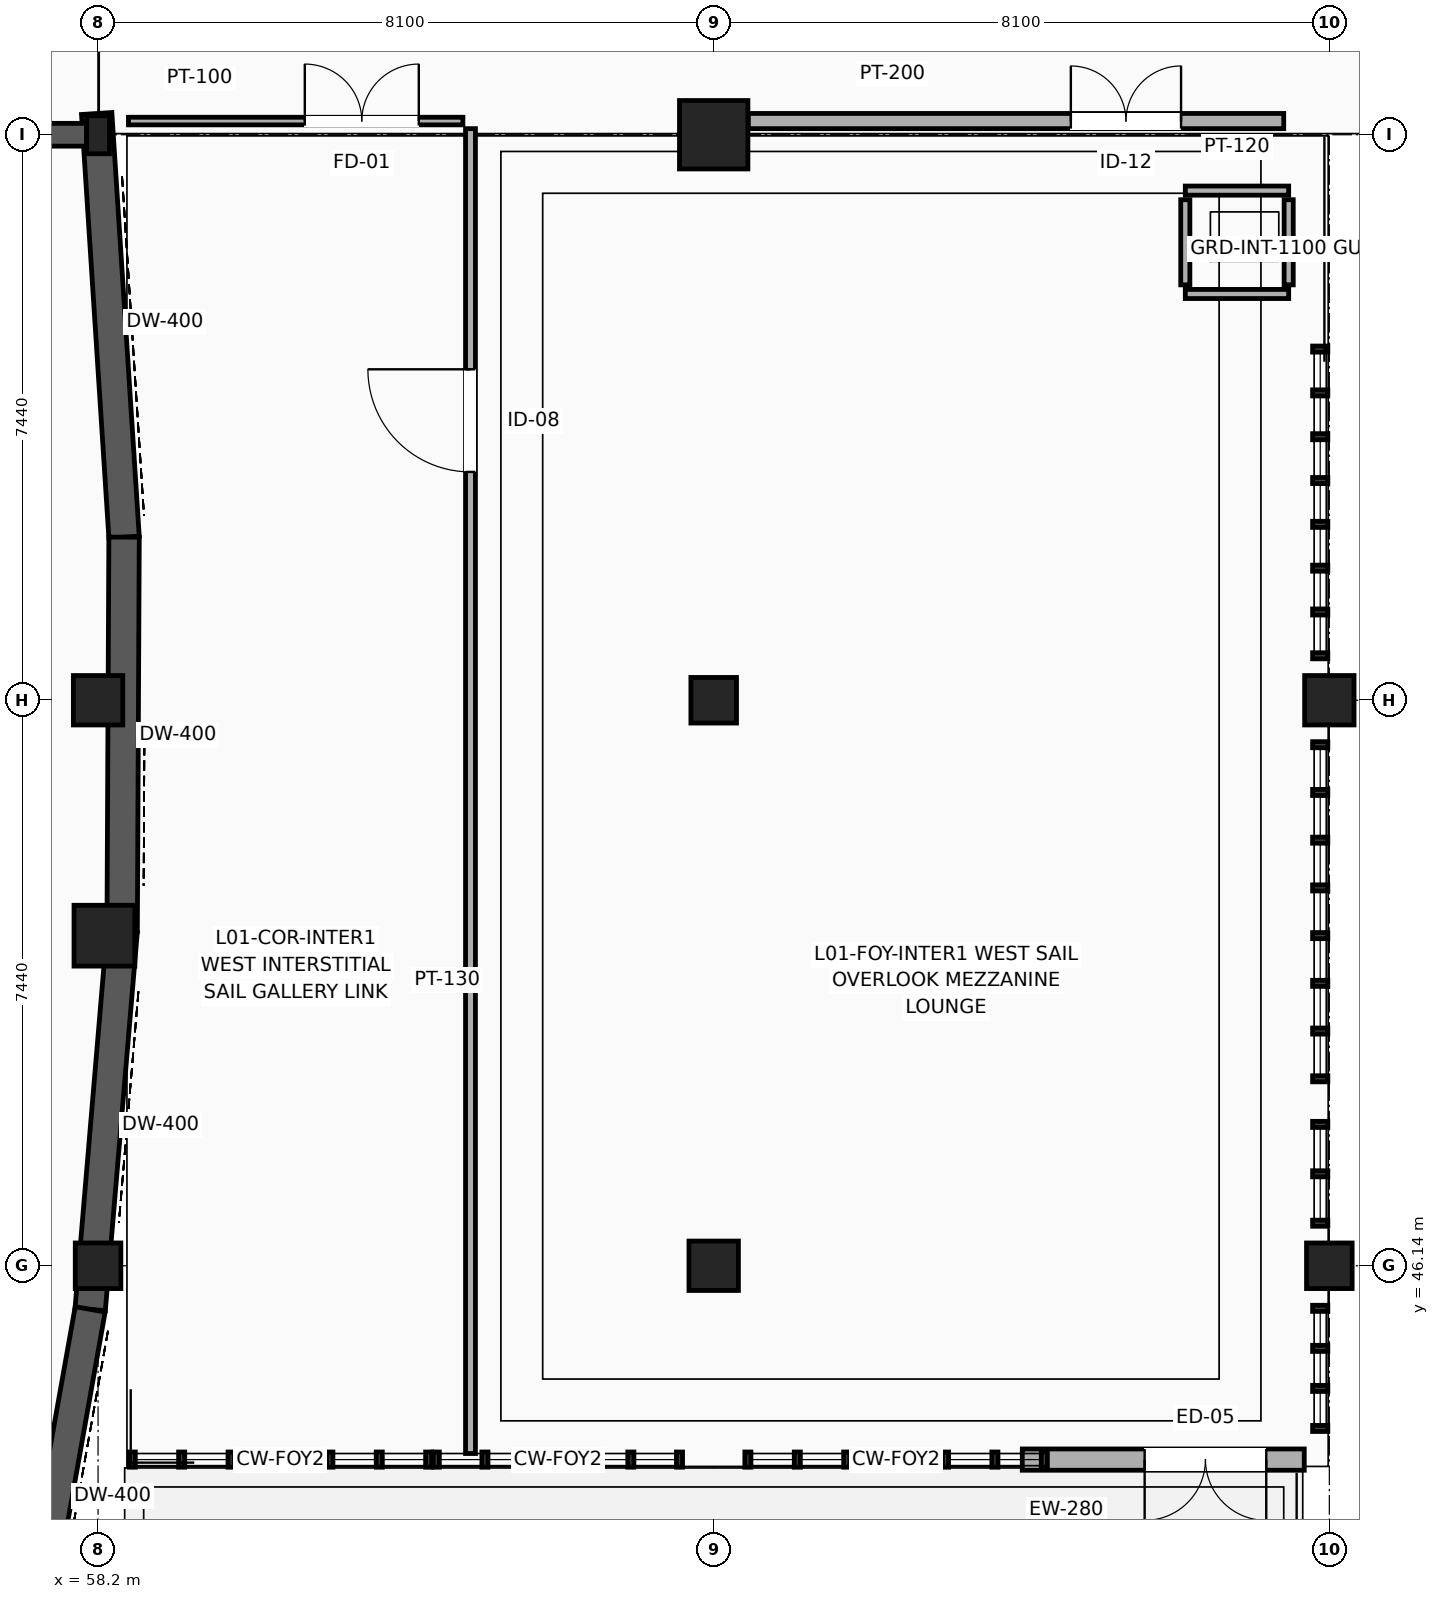
"""IFC4 building model, lengths in metres.
Left out: names, types, materials, properties, quantities, classifications, styles, units other than length and angle.
Written with IfcOpenShell. Run it as: python <this file> out.ifc"""

import sys

from ifc_helpers import new_model, si_unit, direction, frame, frame_2d, origin, origin_2d, place, context, subcontext, project, spatial, rectangle, circle, i_section, extrude, element, fill, save


model = new_model("IFC4")
c1 = context("Model", 3, precision=1e-05, world=origin(), true_north=direction((0.0, 1.0)))
c2 = subcontext(c1, "Body", "Model", "MODEL_VIEW")
j1 = project(units=[si_unit("LENGTHUNIT", "METRE"), si_unit("PLANEANGLEUNIT", "RADIAN")], contexts=[c1])
p1 = place(None, origin())
s1 = spatial("IfcSite", under=j1, at=p1, CompositionType="ELEMENT")
p2 = place(p1, origin())
s2 = spatial("IfcBuilding", under=s1, at=p2, CompositionType="ELEMENT")
p3 = place(p2, frame((0.0, 0.0, 5.4)))
s3 = spatial("IfcBuildingStorey", under=s2, at=p3, CompositionType="ELEMENT", Elevation=5.4)
p4 = place(p3, frame((58.2, 46.14, 0.0), z_axis=(0.0, 0.0, 1.0), x_axis=(1.0, 0.0, 0.0)))
e1 = element("IfcColumn", 1, at=p4, inside=s3, PredefinedType="COLUMN", context=c2, shape_type="SweptSolid", body=[
    extrude(rectangle(XDim=0.6, YDim=0.6, at=origin_2d()), origin(), (0.0, 0.0, 1.0), 4.8),
])
p5 = place(p3, frame((58.2, 53.58, 0.0), z_axis=(0.0, 0.0, 1.0), x_axis=(1.0, 0.0, 0.0)))
e2 = element("IfcColumn", 2, at=p5, inside=s3, PredefinedType="COLUMN", context=c2, shape_type="SweptSolid", body=[
    extrude(circle(Radius=0.325, at=origin_2d()), origin(), (0.0, 0.0, 1.0), 4.8),
])
p6 = place(p3, frame((58.2, 61.02, 0.0), z_axis=(0.0, 0.0, 1.0), x_axis=(1.0, 0.0, 0.0)))
e3 = element("IfcColumn", 3, at=p6, inside=s3, PredefinedType="COLUMN", context=c2, shape_type="SweptSolid", body=[
    extrude(i_section(OverallWidth=0.3, OverallDepth=0.5, WebThickness=0.014, FlangeThickness=0.028, FilletRadius=0.027, at=origin_2d()), origin(), (0.0, 0.0, 1.0), 4.8),
])
p7 = place(p3, frame((66.3, 46.14, 0.0), z_axis=(0.0, 0.0, 1.0), x_axis=(1.0, 0.0, 0.0)))
e4 = element("IfcColumn", 4, at=p7, inside=s3, PredefinedType="COLUMN", context=c2, shape_type="SweptSolid", body=[
    extrude(circle(Radius=0.325, at=origin_2d()), origin(), (0.0, 0.0, 1.0), 4.8),
])
p8 = place(p3, frame((66.3, 53.58, 0.0), z_axis=(0.0, 0.0, 1.0), x_axis=(1.0, 0.0, 0.0)))
e5 = element("IfcColumn", 5, at=p8, inside=s3, PredefinedType="COLUMN", context=c2, shape_type="SweptSolid", body=[
    extrude(rectangle(XDim=0.6, YDim=0.6, at=origin_2d()), origin(), (0.0, 0.0, 1.0), 4.8),
])
p9 = place(p3, frame((66.3, 61.02, 0.0), z_axis=(0.0, 0.0, 1.0), x_axis=(1.0, 0.0, 0.0)))
e6 = element("IfcColumn", 6, at=p9, inside=s3, PredefinedType="COLUMN", context=c2, shape_type="SweptSolid", body=[
    extrude(rectangle(XDim=0.9, YDim=0.9, at=origin_2d()), origin(), (0.0, 0.0, 1.0), 4.8),
])
p10 = place(p3, frame((74.4, 46.14, 0.0), z_axis=(0.0, 0.0, 1.0), x_axis=(1.0, 0.0, 0.0)))
e7 = element("IfcColumn", 7, at=p10, inside=s3, PredefinedType="COLUMN", context=c2, shape_type="SweptSolid", body=[
    extrude(rectangle(XDim=0.6, YDim=0.6, at=origin_2d()), origin(), (0.0, 0.0, 1.0), 4.8),
])
p11 = place(p3, frame((74.4, 53.58, 0.0), z_axis=(0.0, 0.0, 1.0), x_axis=(1.0, 0.0, 0.0)))
e8 = element("IfcColumn", 8, at=p11, inside=s3, PredefinedType="COLUMN", context=c2, shape_type="SweptSolid", body=[
    extrude(circle(Radius=0.325, at=origin_2d()), origin(), (0.0, 0.0, 1.0), 4.8),
])
p12 = place(p3, frame((58.284, 50.482, 0.0), z_axis=(0.0, 0.0, 1.0), x_axis=(1.0, 0.0, 0.0)))
e9 = element("IfcColumn", 9, at=p12, inside=s3, PredefinedType="COLUMN", context=c2, shape_type="SweptSolid", body=[
    extrude(rectangle(XDim=0.8, YDim=0.8, at=origin_2d()), origin(), (0.0, 0.0, 1.0), 4.8),
])
p13 = place(p3, frame((58.182, 61.299, 0.0), z_axis=(0.0, 0.0, 1.0), x_axis=(0.064519893008, -0.997916421053, 0.0)))
e10 = element("IfcWall", 10, at=p13, inside=s3, PredefinedType="SHEAR", context=c2, shape_type="SweptSolid", body=[
    extrude(rectangle(XDim=5.585, YDim=0.4, at=frame_2d((2.792, 0.0))), origin(), (0.0, 0.0, 1.0), 4.525),
])
p14 = place(p3, frame((58.542, 55.726, 0.0), z_axis=(0.0, 0.0, 1.0), x_axis=(-0.004895671688, -0.999988016128, 0.0)))
e11 = element("IfcWall", 11, at=p14, inside=s3, PredefinedType="SHEAR", context=c2, shape_type="SweptSolid", body=[
    extrude(rectangle(XDim=5.186, YDim=0.4, at=frame_2d((2.593, 0.0))), origin(), (0.0, 0.0, 1.0), 4.525),
])
p15 = place(p3, frame((58.517, 50.54, 0.0), z_axis=(0.0, 0.0, 1.0), x_axis=(-0.084239735825, -0.996445516277, 0.0)))
e12 = element("IfcWall", 12, at=p15, inside=s3, PredefinedType="SHEAR", context=c2, shape_type="SweptSolid", body=[
    extrude(rectangle(XDim=4.991, YDim=0.4, at=frame_2d((2.495, 0.0))), origin(), (0.0, 0.0, 1.0), 4.525),
])
p16 = place(p3, frame((58.096, 45.567, 0.0), z_axis=(0.0, 0.0, 1.0), x_axis=(-0.17557456422, -0.98446613573, 0.0)))
e13 = element("IfcWall", 13, at=p16, inside=s3, PredefinedType="SHEAR", context=c2, shape_type="SweptSolid", body=[
    extrude(rectangle(XDim=4.732, YDim=0.4, at=frame_2d((2.366, 0.0))), origin(), (0.0, 0.0, 1.0), 4.525),
])
p17 = place(p3, frame((74.07, 43.59, 0.0), z_axis=(0.0, 0.0, 1.0), x_axis=(-1.0, 0.0, 0.0)))
e14 = element("IfcWall", 14, at=p17, inside=s3, PredefinedType="SOLIDWALL", context=c2, shape_type="SweptSolid", body=[
    extrude(rectangle(XDim=3.71, YDim=0.28, at=frame_2d((1.855, 0.0))), origin(), (0.0, 0.0, 1.0), 4.505),
])
p18 = place(p17, frame((0.5, 0.0, 0.0)))
e15 = element("IfcOpeningElement", 15, at=p18, cuts=e14, PredefinedType="OPENING", context=c2, shape_type="SweptSolid", body=[
    extrude(rectangle(XDim=1.6, YDim=2.3, at=frame_2d((0.8, 1.15))), frame((0.0, 0.15, 0.0), z_axis=(0.0, -1.0, 0.0), x_axis=(1.0, 0.0, 0.0)), (0.0, 0.0, 1.0), 0.3),
])
p19 = place(p3, frame((50.252, 61.02, 0.0), z_axis=(0.0, 0.0, 1.0), x_axis=(1.0, 0.0, 0.0)))
e16 = element("IfcWall", 16, at=p19, inside=s3, PredefinedType="SHEAR", context=c2, shape_type="SweptSolid", body=[
    extrude(rectangle(XDim=7.796, YDim=0.3, at=frame_2d((3.898, 0.0))), origin(), (0.0, 0.0, 1.0), 4.525),
])
p20 = place(p19, frame((4.35, 0.0, 0.0)))
e17 = element("IfcOpeningElement", 17, at=p20, cuts=e16, PredefinedType="OPENING", context=c2, shape_type="SweptSolid", body=[
    extrude(rectangle(XDim=1.8, YDim=2.4, at=frame_2d((0.9, 1.2))), frame((0.0, 0.16, 0.0), z_axis=(0.0, -1.0, 0.0), x_axis=(1.0, 0.0, 0.0)), (0.0, 0.0, 1.0), 0.32),
])
for number, where, z_axis, x_axis in (
    (18, (72.505, 58.925, 0.0), (0.0, 0.0, 1.0), (1.0, 0.0, 0.0)),
    (19, (72.505, 60.285, 0.0), (0.0, 0.0, 1.0), (1.0, 0.0, 0.0)),
):
    element("IfcWall", number, at=place(p3, frame(where, z_axis=z_axis, x_axis=x_axis)), inside=s3, PredefinedType="PARTITIONING", context=c2, shape_type="SweptSolid", body=[
        extrude(rectangle(XDim=1.36, YDim=0.12, at=frame_2d((0.68, 0.0))), origin(), (0.0, 0.0, 1.0), 4.505),
    ])
for number, where, z_axis, x_axis in (
    (20, (72.505, 59.045, 0.0), (0.0, 0.0, 1.0), (0.0, 1.0, 0.0)),
    (21, (73.865, 59.045, 0.0), (0.0, 0.0, 1.0), (0.0, 1.0, 0.0)),
):
    element("IfcWall", number, at=place(p3, frame(where, z_axis=z_axis, x_axis=x_axis)), inside=s3, PredefinedType="PARTITIONING", context=c2, shape_type="SweptSolid", body=[
        extrude(rectangle(XDim=1.12, YDim=0.12, at=frame_2d((0.56, 0.0))), origin(), (0.0, 0.0, 1.0), 4.505),
    ])
p21 = place(p3, frame((63.1, 43.67, 0.0), z_axis=(0.0, 0.0, 1.0), x_axis=(0.0, 1.0, 0.0)))
e22 = element("IfcWall", 22, at=p21, inside=s3, PredefinedType="PARTITIONING", context=c2, shape_type="SweptSolid", body=[
    extrude(rectangle(XDim=17.43, YDim=0.13, at=frame_2d((8.715, 0.0))), origin(), (0.0, 0.0, 1.0), 3.687),
])
p22 = place(p21, frame((12.914, 0.0, 0.0)))
e23 = element("IfcOpeningElement", 23, at=p22, cuts=e22, PredefinedType="OPENING", context=c2, shape_type="SweptSolid", body=[
    extrude(rectangle(XDim=1.35, YDim=2.2, at=frame_2d((0.675, 1.1))), frame((0.0, 0.075, 0.0), z_axis=(0.0, -1.0, 0.0), x_axis=(1.0, 0.0, 0.0)), (0.0, 0.0, 1.0), 0.15),
])
p23 = place(p3, frame((58.6, 61.2, 0.0), z_axis=(0.0, 0.0, 1.0), x_axis=(1.0, 0.0, 0.0)))
e24 = element("IfcWall", 24, at=p23, inside=s3, PredefinedType="PARTITIONING", context=c2, shape_type="SweptSolid", body=[
    extrude(rectangle(XDim=4.4, YDim=0.1, at=frame_2d((2.2, 0.0))), origin(), (0.0, 0.0, 1.0), 3.687),
])
p24 = place(p23, frame((2.32, 0.0, 0.0)))
e25 = element("IfcOpeningElement", 25, at=p24, cuts=e24, PredefinedType="OPENING", context=c2, shape_type="SweptSolid", body=[
    extrude(rectangle(XDim=1.5, YDim=2.2, at=frame_2d((0.75, 1.1))), frame((0.0, 0.06, 0.0), z_axis=(0.0, -1.0, 0.0), x_axis=(1.0, 0.0, 0.0)), (0.0, 0.0, 1.0), 0.12),
])
p25 = place(p3, frame((66.755, 61.2, 0.0), z_axis=(0.0, 0.0, 1.0), x_axis=(1.0, 0.0, 0.0)))
e26 = element("IfcWall", 26, at=p25, inside=s3, PredefinedType="PARTITIONING", context=c2, shape_type="SweptSolid", body=[
    extrude(rectangle(XDim=7.045, YDim=0.2, at=frame_2d((3.522, 0.0))), origin(), (0.0, 0.0, 1.0), 3.287),
])
p26 = place(p25, frame((4.244, 0.0, 0.0)))
e27 = element("IfcOpeningElement", 27, at=p26, cuts=e26, PredefinedType="OPENING", context=c2, shape_type="SweptSolid", body=[
    extrude(rectangle(XDim=1.45, YDim=2.3, at=frame_2d((0.725, 1.15))), frame((0.0, 0.11, 0.0), z_axis=(0.0, -1.0, 0.0), x_axis=(1.0, 0.0, 0.0)), (0.0, 0.0, 1.0), 0.22),
])
p27 = place(p18, origin())
e28 = element("IfcDoor", 28, at=p27, inside=s3, OperationType="DOUBLE_DOOR_SINGLE_SWING", PredefinedType="DOOR", context=c2, shape_type="SweptSolid", body=[
    extrude(rectangle(XDim=1.6, YDim=2.3, at=frame_2d((0.8, 1.15))), frame((0.0, 0.025, 0.0), z_axis=(0.0, -1.0, 0.0), x_axis=(1.0, 0.0, 0.0)), (0.0, 0.0, 1.0), 0.05),
])
fill(e15, e28)
p28 = place(p22, origin())
e29 = element("IfcDoor", 29, at=p28, inside=s3, OperationType="SINGLE_SWING_RIGHT", PredefinedType="DOOR", context=c2, shape_type="SweptSolid", body=[
    extrude(rectangle(XDim=1.35, YDim=2.2, at=frame_2d((0.675, 1.1))), frame((0.0, 0.025, 0.0), z_axis=(0.0, -1.0, 0.0), x_axis=(1.0, 0.0, 0.0)), (0.0, 0.0, 1.0), 0.05),
])
fill(e23, e29)
p29 = place(p24, origin())
e30 = element("IfcDoor", 30, at=p29, inside=s3, OperationType="DOUBLE_DOOR_SINGLE_SWING", PredefinedType="DOOR", context=c2, shape_type="SweptSolid", body=[
    extrude(rectangle(XDim=1.5, YDim=2.2, at=frame_2d((0.75, 1.1))), frame((0.0, 0.025, 0.0), z_axis=(0.0, -1.0, 0.0), x_axis=(1.0, 0.0, 0.0)), (0.0, 0.0, 1.0), 0.05),
])
fill(e25, e30)
p30 = place(p26, origin())
e31 = element("IfcDoor", 31, at=p30, inside=s3, OperationType="DOUBLE_DOOR_SINGLE_SWING", PredefinedType="DOOR", context=c2, shape_type="SweptSolid", body=[
    extrude(rectangle(XDim=1.45, YDim=2.3, at=frame_2d((0.725, 1.15))), frame((0.0, 0.025, 0.0), z_axis=(0.0, -1.0, 0.0), x_axis=(1.0, 0.0, 0.0)), (0.0, 0.0, 1.0), 0.05),
])
fill(e27, e31)
save(model, sys.argv[1])
